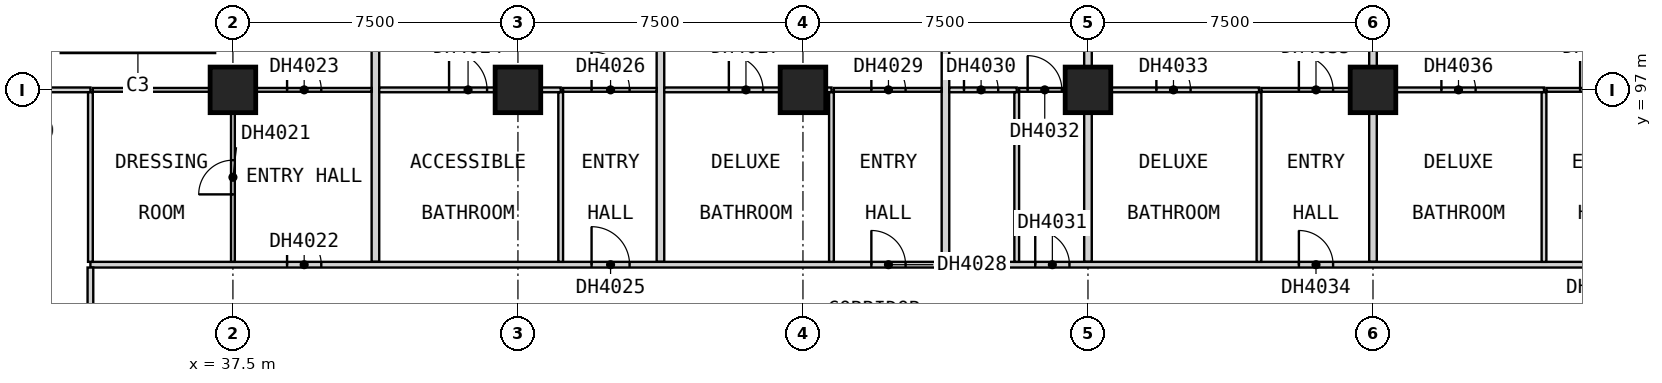
"""IFC4 building model, lengths in metres.
Left out: names, types, materials, properties, quantities, classifications, styles, units other than length and angle.
Written with IfcOpenShell. Run it as: python <this file> out.ifc"""

import sys

from ifc_helpers import new_model, si_unit, direction, frame, frame_2d, origin, origin_2d, place, context, subcontext, project, spatial, rectangle, extrude, element, fill, save


model = new_model("IFC4")
c1 = context("Model", 3, precision=1e-05, world=origin(), true_north=direction((0.0, 1.0)))
c2 = subcontext(c1, "Body", "Model", "MODEL_VIEW")
j1 = project(units=[si_unit("LENGTHUNIT", "METRE"), si_unit("PLANEANGLEUNIT", "RADIAN")], contexts=[c1])
p1 = place(None, origin())
s1 = spatial("IfcSite", under=j1, at=p1, CompositionType="ELEMENT")
p2 = place(p1, origin())
s2 = spatial("IfcBuilding", under=s1, at=p2, CompositionType="ELEMENT")
p3 = place(p2, frame((0.0, 0.0, 44.8)))
s3 = spatial("IfcBuildingStorey", under=s2, at=p3, CompositionType="ELEMENT", Elevation=44.8)
for number, where, z_axis, x_axis in (
    (1, (37.5, 97.0, 0.0), (0.0, 0.0, 1.0), (1.0, 0.0, 0.0)),
    (2, (45.0, 97.0, 0.0), (0.0, 0.0, 1.0), (1.0, 0.0, 0.0)),
    (3, (52.5, 97.0, 0.0), (0.0, 0.0, 1.0), (1.0, 0.0, 0.0)),
    (4, (60.0, 97.0, 0.0), (0.0, 0.0, 1.0), (1.0, 0.0, 0.0)),
    (5, (67.5, 97.0, 0.0), (0.0, 0.0, 1.0), (1.0, 0.0, 0.0)),
):
    element("IfcColumn", number, at=place(p3, frame(where, z_axis=z_axis, x_axis=x_axis)), inside=s3, PredefinedType="COLUMN", context=c2, shape_type="SweptSolid", body=[
        extrude(rectangle(XDim=1.2, YDim=1.2, at=origin_2d()), origin(), (0.0, 0.0, 1.0), 3.6),
    ])
for number, where, z_axis, x_axis in (
    (6, (41.25, 92.475, 0.0), (0.0, 0.0, 1.0), (0.0, 1.0, 0.0)),
    (7, (48.75, 92.475, 0.0), (0.0, 0.0, 1.0), (0.0, 1.0, 0.0)),
    (8, (56.25, 92.475, 0.0), (0.0, 0.0, 1.0), (0.0, 1.0, 0.0)),
):
    element("IfcWall", number, at=place(p3, frame(where, z_axis=z_axis, x_axis=x_axis)), inside=s3, PredefinedType="PARTITIONING", context=c2, shape_type="SweptSolid", body=[
        extrude(rectangle(XDim=11.715, YDim=0.2, at=frame_2d((5.857, 0.0))), origin(), (0.0, 0.0, 1.0), 3.35),
    ])
for number, where, z_axis, x_axis in (
    (9, (60.0, 92.475, 0.0), (0.0, 0.0, 1.0), (0.0, 1.0, 0.0)),
    (10, (67.5, 92.475, 0.0), (0.0, 0.0, 1.0), (0.0, 1.0, 0.0)),
):
    element("IfcWall", number, at=place(p3, frame(where, z_axis=z_axis, x_axis=x_axis)), inside=s3, PredefinedType="PARTITIONING", context=c2, shape_type="SweptSolid", body=[
        extrude(rectangle(XDim=12.525, YDim=0.2, at=frame_2d((6.262, 0.0))), origin(), (0.0, 0.0, 1.0), 3.35),
    ])
p4 = place(p3, frame((33.75, 92.4, 0.0), z_axis=(0.0, 0.0, 1.0), x_axis=(1.0, 0.0, 0.0)))
e11 = element("IfcWall", 11, at=p4, inside=s3, PredefinedType="PARTITIONING", context=c2, shape_type="SweptSolid", body=[
    extrude(rectangle(XDim=43.65, YDim=0.15, at=frame_2d((21.825, 0.0))), origin(), (0.0, 0.0, 1.0), 3.35),
])
p5 = place(p4, frame((5.175, 0.0, 0.0)))
e12 = element("IfcOpeningElement", 12, at=p5, cuts=e11, PredefinedType="OPENING", context=c2, shape_type="SweptSolid", body=[
    extrude(rectangle(XDim=0.9, YDim=2.1, at=frame_2d((0.45, 1.05))), frame((0.0, 0.085, 0.0), z_axis=(0.0, -1.0, 0.0), x_axis=(1.0, 0.0, 0.0)), (0.0, 0.0, 1.0), 0.17),
])
p6 = place(p4, frame((13.188, 0.0, 0.0)))
e13 = element("IfcOpeningElement", 13, at=p6, cuts=e11, PredefinedType="OPENING", context=c2, shape_type="SweptSolid", body=[
    extrude(rectangle(XDim=1.0, YDim=2.1, at=frame_2d((0.5, 1.05))), frame((0.0, 0.085, 0.0), z_axis=(0.0, -1.0, 0.0), x_axis=(1.0, 0.0, 0.0)), (0.0, 0.0, 1.0), 0.17),
])
p7 = place(p4, frame((20.55, 0.0, 0.0)))
e14 = element("IfcOpeningElement", 14, at=p7, cuts=e11, PredefinedType="OPENING", context=c2, shape_type="SweptSolid", body=[
    extrude(rectangle(XDim=0.9, YDim=2.1, at=frame_2d((0.45, 1.05))), frame((0.0, 0.085, 0.0), z_axis=(0.0, -1.0, 0.0), x_axis=(1.0, 0.0, 0.0)), (0.0, 0.0, 1.0), 0.17),
])
p8 = place(p4, frame((24.863, 0.0, 0.0)))
e15 = element("IfcOpeningElement", 15, at=p8, cuts=e11, PredefinedType="OPENING", context=c2, shape_type="SweptSolid", body=[
    extrude(rectangle(XDim=0.9, YDim=2.1, at=frame_2d((0.45, 1.05))), frame((0.0, 0.085, 0.0), z_axis=(0.0, -1.0, 0.0), x_axis=(1.0, 0.0, 0.0)), (0.0, 0.0, 1.0), 0.17),
])
p9 = place(p4, frame((31.8, 0.0, 0.0)))
e16 = element("IfcOpeningElement", 16, at=p9, cuts=e11, PredefinedType="OPENING", context=c2, shape_type="SweptSolid", body=[
    extrude(rectangle(XDim=0.9, YDim=2.1, at=frame_2d((0.45, 1.05))), frame((0.0, 0.085, 0.0), z_axis=(0.0, -1.0, 0.0), x_axis=(1.0, 0.0, 0.0)), (0.0, 0.0, 1.0), 0.17),
])
p10 = place(p4, frame((39.3, 0.0, 0.0)))
e17 = element("IfcOpeningElement", 17, at=p10, cuts=e11, PredefinedType="OPENING", context=c2, shape_type="SweptSolid", body=[
    extrude(rectangle(XDim=0.9, YDim=2.1, at=frame_2d((0.45, 1.05))), frame((0.0, 0.085, 0.0), z_axis=(0.0, -1.0, 0.0), x_axis=(1.0, 0.0, 0.0)), (0.0, 0.0, 1.0), 0.17),
])
p11 = place(p4, frame((42.0, 0.0, 0.0)))
e18 = element("IfcOpeningElement", 18, at=p11, cuts=e11, PredefinedType="OPENING", context=c2, shape_type="SweptSolid", body=[
    extrude(rectangle(XDim=0.9, YDim=2.1, at=frame_2d((0.45, 1.05))), frame((0.0, 0.085, 0.0), z_axis=(0.0, -1.0, 0.0), x_axis=(1.0, 0.0, 0.0)), (0.0, 0.0, 1.0), 0.17),
])
p12 = place(p3, frame((33.75, 90.1, 0.0), z_axis=(0.0, 0.0, 1.0), x_axis=(0.0, 1.0, 0.0)))
e19 = element("IfcWall", 19, at=p12, inside=s3, PredefinedType="PARTITIONING", context=c2, shape_type="SweptSolid", body=[
    extrude(rectangle(XDim=2.225, YDim=0.15, at=frame_2d((1.112, 0.0))), origin(), (0.0, 0.0, 1.0), 3.35),
])
p13 = place(p3, frame((33.812, 97.0, 0.0), z_axis=(0.0, 0.0, 1.0), x_axis=(1.0, 0.0, 0.0)))
e20 = element("IfcWall", 20, at=p13, inside=s3, PredefinedType="PARTITIONING", context=c2, shape_type="SweptSolid", body=[
    extrude(rectangle(XDim=7.337, YDim=0.1, at=frame_2d((3.669, 0.0))), origin(), (0.0, 0.0, 1.0), 3.35),
])
p14 = place(p13, frame((5.113, 0.0, 0.0)))
e21 = element("IfcOpeningElement", 21, at=p14, cuts=e20, PredefinedType="OPENING", context=c2, shape_type="SweptSolid", body=[
    extrude(rectangle(XDim=0.9, YDim=2.1, at=frame_2d((0.45, 1.05))), frame((0.0, 0.06, 0.0), z_axis=(0.0, -1.0, 0.0), x_axis=(1.0, 0.0, 0.0)), (0.0, 0.0, 1.0), 0.12),
])
p15 = place(p3, frame((46.188, 97.0, 0.0), z_axis=(0.0, 0.0, 1.0), x_axis=(1.0, 0.0, 0.0)))
e22 = element("IfcWall", 22, at=p15, inside=s3, PredefinedType="PARTITIONING", context=c2, shape_type="SweptSolid", body=[
    extrude(rectangle(XDim=2.462, YDim=0.1, at=frame_2d((1.231, 0.0))), origin(), (0.0, 0.0, 1.0), 3.35),
])
p16 = place(p15, frame((0.75, 0.0, 0.0)))
e23 = element("IfcOpeningElement", 23, at=p16, cuts=e22, PredefinedType="OPENING", context=c2, shape_type="SweptSolid", body=[
    extrude(rectangle(XDim=1.0, YDim=2.1, at=frame_2d((0.5, 1.05))), frame((0.0, 0.06, 0.0), z_axis=(0.0, -1.0, 0.0), x_axis=(1.0, 0.0, 0.0)), (0.0, 0.0, 1.0), 0.12),
])
p17 = place(p3, frame((53.312, 97.0, 0.0), z_axis=(0.0, 0.0, 1.0), x_axis=(1.0, 0.0, 0.0)))
e24 = element("IfcWall", 24, at=p17, inside=s3, PredefinedType="PARTITIONING", context=c2, shape_type="SweptSolid", body=[
    extrude(rectangle(XDim=2.837, YDim=0.1, at=frame_2d((1.419, 0.0))), origin(), (0.0, 0.0, 1.0), 3.35),
])
p18 = place(p17, frame((0.988, 0.0, 0.0)))
e25 = element("IfcOpeningElement", 25, at=p18, cuts=e24, PredefinedType="OPENING", context=c2, shape_type="SweptSolid", body=[
    extrude(rectangle(XDim=0.9, YDim=2.1, at=frame_2d((0.45, 1.05))), frame((0.0, 0.06, 0.0), z_axis=(0.0, -1.0, 0.0), x_axis=(1.0, 0.0, 0.0)), (0.0, 0.0, 1.0), 0.12),
])
p19 = place(p3, frame((58.188, 97.0, 0.0), z_axis=(0.0, 0.0, 1.0), x_axis=(1.0, 0.0, 0.0)))
e26 = element("IfcWall", 26, at=p19, inside=s3, PredefinedType="PARTITIONING", context=c2, shape_type="SweptSolid", body=[
    extrude(rectangle(XDim=1.712, YDim=0.1, at=frame_2d((0.856, 0.0))), origin(), (0.0, 0.0, 1.0), 3.35),
])
p20 = place(p19, frame((0.225, 0.0, 0.0)))
e27 = element("IfcOpeningElement", 27, at=p20, cuts=e26, PredefinedType="OPENING", context=c2, shape_type="SweptSolid", body=[
    extrude(rectangle(XDim=0.9, YDim=2.1, at=frame_2d((0.45, 1.05))), frame((0.0, 0.06, 0.0), z_axis=(0.0, -1.0, 0.0), x_axis=(1.0, 0.0, 0.0)), (0.0, 0.0, 1.0), 0.12),
])
p21 = place(p3, frame((64.562, 97.0, 0.0), z_axis=(0.0, 0.0, 1.0), x_axis=(1.0, 0.0, 0.0)))
e28 = element("IfcWall", 28, at=p21, inside=s3, PredefinedType="PARTITIONING", context=c2, shape_type="SweptSolid", body=[
    extrude(rectangle(XDim=2.837, YDim=0.1, at=frame_2d((1.419, 0.0))), origin(), (0.0, 0.0, 1.0), 3.35),
])
p22 = place(p21, frame((0.988, 0.0, 0.0)))
e29 = element("IfcOpeningElement", 29, at=p22, cuts=e28, PredefinedType="OPENING", context=c2, shape_type="SweptSolid", body=[
    extrude(rectangle(XDim=0.9, YDim=2.1, at=frame_2d((0.45, 1.05))), frame((0.0, 0.06, 0.0), z_axis=(0.0, -1.0, 0.0), x_axis=(1.0, 0.0, 0.0)), (0.0, 0.0, 1.0), 0.12),
])
p23 = place(p3, frame((72.062, 97.0, 0.0), z_axis=(0.0, 0.0, 1.0), x_axis=(1.0, 0.0, 0.0)))
e30 = element("IfcWall", 30, at=p23, inside=s3, PredefinedType="PARTITIONING", context=c2, shape_type="SweptSolid", body=[
    extrude(rectangle(XDim=2.837, YDim=0.1, at=frame_2d((1.419, 0.0))), origin(), (0.0, 0.0, 1.0), 3.35),
])
p24 = place(p23, frame((0.887, 0.0, 0.0)))
e31 = element("IfcOpeningElement", 31, at=p24, cuts=e30, PredefinedType="OPENING", context=c2, shape_type="SweptSolid", body=[
    extrude(rectangle(XDim=0.9, YDim=2.1, at=frame_2d((0.45, 1.05))), frame((0.0, 0.06, 0.0), z_axis=(0.0, -1.0, 0.0), x_axis=(1.0, 0.0, 0.0)), (0.0, 0.0, 1.0), 0.12),
])
p25 = place(p3, frame((37.5, 92.475, 0.0), z_axis=(0.0, 0.0, 1.0), x_axis=(0.0, 1.0, 0.0)))
e32 = element("IfcWall", 32, at=p25, inside=s3, PredefinedType="PARTITIONING", context=c2, shape_type="SweptSolid", body=[
    extrude(rectangle(XDim=4.475, YDim=0.1, at=frame_2d((2.237, 0.0))), origin(), (0.0, 0.0, 1.0), 3.35),
])
p26 = place(p25, frame((1.775, 0.0, 0.0)))
e33 = element("IfcOpeningElement", 33, at=p26, cuts=e32, PredefinedType="OPENING", context=c2, shape_type="SweptSolid", body=[
    extrude(rectangle(XDim=0.9, YDim=2.1, at=frame_2d((0.45, 1.05))), frame((0.0, 0.06, 0.0), z_axis=(0.0, -1.0, 0.0), x_axis=(1.0, 0.0, 0.0)), (0.0, 0.0, 1.0), 0.12),
])
p27 = place(p3, frame((30.0, 97.0, 0.0), z_axis=(0.0, 0.0, 1.0), x_axis=(1.0, 0.0, 0.0)))
e34 = element("IfcWall", 34, at=p27, inside=s3, PredefinedType="PARTITIONING", context=c2, shape_type="SweptSolid", body=[
    extrude(rectangle(XDim=3.75, YDim=0.125, at=frame_2d((1.875, 0.0))), origin(), (0.0, 0.0, 1.0), 3.35),
])
p28 = place(p27, frame((1.425, 0.0, 0.0)))
e35 = element("IfcOpeningElement", 35, at=p28, cuts=e34, PredefinedType="OPENING", context=c2, shape_type="SweptSolid", body=[
    extrude(rectangle(XDim=0.9, YDim=2.1, at=frame_2d((0.45, 1.05))), frame((0.0, 0.073, 0.0), z_axis=(0.0, -1.0, 0.0), x_axis=(1.0, 0.0, 0.0)), (0.0, 0.0, 1.0), 0.145),
])
p29 = place(p3, frame((41.35, 97.0, 0.0), z_axis=(0.0, 0.0, 1.0), x_axis=(1.0, 0.0, 0.0)))
e36 = element("IfcWall", 36, at=p29, inside=s3, PredefinedType="PARTITIONING", context=c2, shape_type="SweptSolid", body=[
    extrude(rectangle(XDim=4.775, YDim=0.125, at=frame_2d((2.387, 0.0))), origin(), (0.0, 0.0, 1.0), 3.35),
])
p30 = place(p29, frame((1.837, 0.0, 0.0)))
e37 = element("IfcOpeningElement", 37, at=p30, cuts=e36, PredefinedType="OPENING", context=c2, shape_type="SweptSolid", body=[
    extrude(rectangle(XDim=1.0, YDim=2.1, at=frame_2d((0.5, 1.05))), frame((0.0, 0.073, 0.0), z_axis=(0.0, -1.0, 0.0), x_axis=(1.0, 0.0, 0.0)), (0.0, 0.0, 1.0), 0.145),
])
p31 = place(p3, frame((48.85, 97.0, 0.0), z_axis=(0.0, 0.0, 1.0), x_axis=(1.0, 0.0, 0.0)))
e38 = element("IfcWall", 38, at=p31, inside=s3, PredefinedType="PARTITIONING", context=c2, shape_type="SweptSolid", body=[
    extrude(rectangle(XDim=4.4, YDim=0.125, at=frame_2d((2.2, 0.0))), origin(), (0.0, 0.0, 1.0), 3.35),
])
p32 = place(p31, frame((1.7, 0.0, 0.0)))
e39 = element("IfcOpeningElement", 39, at=p32, cuts=e38, PredefinedType="OPENING", context=c2, shape_type="SweptSolid", body=[
    extrude(rectangle(XDim=0.9, YDim=2.1, at=frame_2d((0.45, 1.05))), frame((0.0, 0.073, 0.0), z_axis=(0.0, -1.0, 0.0), x_axis=(1.0, 0.0, 0.0)), (0.0, 0.0, 1.0), 0.145),
])
p33 = place(p3, frame((56.35, 97.0, 0.0), z_axis=(0.0, 0.0, 1.0), x_axis=(1.0, 0.0, 0.0)))
e40 = element("IfcWall", 40, at=p33, inside=s3, PredefinedType="PARTITIONING", context=c2, shape_type="SweptSolid", body=[
    extrude(rectangle(XDim=1.775, YDim=0.125, at=frame_2d((0.887, 0.0))), origin(), (0.0, 0.0, 1.0), 3.35),
])
p34 = place(p33, frame((0.387, 0.0, 0.0)))
e41 = element("IfcOpeningElement", 41, at=p34, cuts=e40, PredefinedType="OPENING", context=c2, shape_type="SweptSolid", body=[
    extrude(rectangle(XDim=0.9, YDim=2.1, at=frame_2d((0.45, 1.05))), frame((0.0, 0.073, 0.0), z_axis=(0.0, -1.0, 0.0), x_axis=(1.0, 0.0, 0.0)), (0.0, 0.0, 1.0), 0.145),
])
p35 = place(p3, frame((60.1, 97.0, 0.0), z_axis=(0.0, 0.0, 1.0), x_axis=(1.0, 0.0, 0.0)))
e42 = element("IfcWall", 42, at=p35, inside=s3, PredefinedType="PARTITIONING", context=c2, shape_type="SweptSolid", body=[
    extrude(rectangle(XDim=4.4, YDim=0.125, at=frame_2d((2.2, 0.0))), origin(), (0.0, 0.0, 1.0), 3.35),
])
p36 = place(p35, frame((1.7, 0.0, 0.0)))
e43 = element("IfcOpeningElement", 43, at=p36, cuts=e42, PredefinedType="OPENING", context=c2, shape_type="SweptSolid", body=[
    extrude(rectangle(XDim=0.9, YDim=2.1, at=frame_2d((0.45, 1.05))), frame((0.0, 0.073, 0.0), z_axis=(0.0, -1.0, 0.0), x_axis=(1.0, 0.0, 0.0)), (0.0, 0.0, 1.0), 0.145),
])
p37 = place(p3, frame((67.6, 97.0, 0.0), z_axis=(0.0, 0.0, 1.0), x_axis=(1.0, 0.0, 0.0)))
e44 = element("IfcWall", 44, at=p37, inside=s3, PredefinedType="PARTITIONING", context=c2, shape_type="SweptSolid", body=[
    extrude(rectangle(XDim=4.4, YDim=0.125, at=frame_2d((2.2, 0.0))), origin(), (0.0, 0.0, 1.0), 3.35),
])
p38 = place(p37, frame((1.7, 0.0, 0.0)))
e45 = element("IfcOpeningElement", 45, at=p38, cuts=e44, PredefinedType="OPENING", context=c2, shape_type="SweptSolid", body=[
    extrude(rectangle(XDim=0.9, YDim=2.1, at=frame_2d((0.45, 1.05))), frame((0.0, 0.073, 0.0), z_axis=(0.0, -1.0, 0.0), x_axis=(1.0, 0.0, 0.0)), (0.0, 0.0, 1.0), 0.145),
])
for number, where, z_axis, x_axis in (
    (46, (33.75, 92.475, 0.0), (0.0, 0.0, 1.0), (0.0, 1.0, 0.0)),
    (47, (46.125, 92.475, 0.0), (0.0, 0.0, 1.0), (0.0, 1.0, 0.0)),
    (48, (53.25, 92.475, 0.0), (0.0, 0.0, 1.0), (0.0, 1.0, 0.0)),
    (49, (58.125, 92.475, 0.0), (0.0, 0.0, 1.0), (0.0, 1.0, 0.0)),
    (50, (64.5, 92.475, 0.0), (0.0, 0.0, 1.0), (0.0, 1.0, 0.0)),
    (51, (72.0, 92.475, 0.0), (0.0, 0.0, 1.0), (0.0, 1.0, 0.0)),
):
    element("IfcWall", number, at=place(p3, frame(where, z_axis=z_axis, x_axis=x_axis)), inside=s3, PredefinedType="PARTITIONING", context=c2, shape_type="SweptSolid", body=[
        extrude(rectangle(XDim=4.462, YDim=0.125, at=frame_2d((2.231, 0.0))), origin(), (0.0, 0.0, 1.0), 3.35),
    ])
p39 = place(p26, origin())
e52 = element("IfcDoor", 52, at=p39, inside=s3, OperationType="SINGLE_SWING_RIGHT", PredefinedType="DOOR", context=c2, shape_type="SweptSolid", body=[
    extrude(rectangle(XDim=0.9, YDim=2.1, at=frame_2d((0.45, 1.05))), frame((0.0, 0.025, 0.0), z_axis=(0.0, -1.0, 0.0), x_axis=(1.0, 0.0, 0.0)), (0.0, 0.0, 1.0), 0.05),
])
fill(e33, e52)
p40 = place(p5, origin())
e53 = element("IfcDoor", 53, at=p40, inside=s3, OperationType="SINGLE_SWING_LEFT", PredefinedType="DOOR", context=c2, shape_type="SweptSolid", body=[
    extrude(rectangle(XDim=0.9, YDim=2.1, at=frame_2d((0.45, 1.05))), frame((0.0, 0.025, 0.0), z_axis=(0.0, -1.0, 0.0), x_axis=(1.0, 0.0, 0.0)), (0.0, 0.0, 1.0), 0.05),
])
fill(e12, e53)
p41 = place(p14, origin())
e54 = element("IfcDoor", 54, at=p41, inside=s3, OperationType="SINGLE_SWING_RIGHT", PredefinedType="DOOR", context=c2, shape_type="SweptSolid", body=[
    extrude(rectangle(XDim=0.9, YDim=2.1, at=frame_2d((0.45, 1.05))), frame((0.0, 0.025, 0.0), z_axis=(0.0, -1.0, 0.0), x_axis=(1.0, 0.0, 0.0)), (0.0, 0.0, 1.0), 0.05),
])
fill(e21, e54)
p42 = place(p30, origin())
e55 = element("IfcDoor", 55, at=p42, inside=s3, OperationType="SINGLE_SWING_RIGHT", PredefinedType="DOOR", context=c2, shape_type="SweptSolid", body=[
    extrude(rectangle(XDim=1.0, YDim=2.1, at=frame_2d((0.5, 1.05))), frame((0.0, 0.025, 0.0), z_axis=(0.0, -1.0, 0.0), x_axis=(1.0, 0.0, 0.0)), (0.0, 0.0, 1.0), 0.05),
])
fill(e37, e55)
p43 = place(p6, origin())
e56 = element("IfcDoor", 56, at=p43, inside=s3, OperationType="SINGLE_SWING_LEFT", PredefinedType="DOOR", context=c2, shape_type="SweptSolid", body=[
    extrude(rectangle(XDim=1.0, YDim=2.1, at=frame_2d((0.5, 1.05))), frame((0.0, 0.025, 0.0), z_axis=(0.0, -1.0, 0.0), x_axis=(1.0, 0.0, 0.0)), (0.0, 0.0, 1.0), 0.05),
])
fill(e13, e56)
p44 = place(p16, origin())
e57 = element("IfcDoor", 57, at=p44, inside=s3, OperationType="SINGLE_SWING_RIGHT", PredefinedType="DOOR", context=c2, shape_type="SweptSolid", body=[
    extrude(rectangle(XDim=1.0, YDim=2.1, at=frame_2d((0.5, 1.05))), frame((0.0, 0.025, 0.0), z_axis=(0.0, -1.0, 0.0), x_axis=(1.0, 0.0, 0.0)), (0.0, 0.0, 1.0), 0.05),
])
fill(e23, e57)
p45 = place(p32, origin())
e58 = element("IfcDoor", 58, at=p45, inside=s3, OperationType="SINGLE_SWING_RIGHT", PredefinedType="DOOR", context=c2, shape_type="SweptSolid", body=[
    extrude(rectangle(XDim=0.9, YDim=2.1, at=frame_2d((0.45, 1.05))), frame((0.0, 0.025, 0.0), z_axis=(0.0, -1.0, 0.0), x_axis=(1.0, 0.0, 0.0)), (0.0, 0.0, 1.0), 0.05),
])
fill(e39, e58)
p46 = place(p7, origin())
e59 = element("IfcDoor", 59, at=p46, inside=s3, OperationType="SINGLE_SWING_LEFT", PredefinedType="DOOR", context=c2, shape_type="SweptSolid", body=[
    extrude(rectangle(XDim=0.9, YDim=2.1, at=frame_2d((0.45, 1.05))), frame((0.0, 0.025, 0.0), z_axis=(0.0, -1.0, 0.0), x_axis=(1.0, 0.0, 0.0)), (0.0, 0.0, 1.0), 0.05),
])
fill(e14, e59)
p47 = place(p18, origin())
e60 = element("IfcDoor", 60, at=p47, inside=s3, OperationType="SINGLE_SWING_RIGHT", PredefinedType="DOOR", context=c2, shape_type="SweptSolid", body=[
    extrude(rectangle(XDim=0.9, YDim=2.1, at=frame_2d((0.45, 1.05))), frame((0.0, 0.025, 0.0), z_axis=(0.0, -1.0, 0.0), x_axis=(1.0, 0.0, 0.0)), (0.0, 0.0, 1.0), 0.05),
])
fill(e25, e60)
p48 = place(p34, origin())
e61 = element("IfcDoor", 61, at=p48, inside=s3, OperationType="SINGLE_SWING_RIGHT", PredefinedType="DOOR", context=c2, shape_type="SweptSolid", body=[
    extrude(rectangle(XDim=0.9, YDim=2.1, at=frame_2d((0.45, 1.05))), frame((0.0, 0.025, 0.0), z_axis=(0.0, -1.0, 0.0), x_axis=(1.0, 0.0, 0.0)), (0.0, 0.0, 1.0), 0.05),
])
fill(e41, e61)
p49 = place(p8, origin())
e62 = element("IfcDoor", 62, at=p49, inside=s3, OperationType="SINGLE_SWING_LEFT", PredefinedType="DOOR", context=c2, shape_type="SweptSolid", body=[
    extrude(rectangle(XDim=0.9, YDim=2.1, at=frame_2d((0.45, 1.05))), frame((0.0, 0.025, 0.0), z_axis=(0.0, -1.0, 0.0), x_axis=(1.0, 0.0, 0.0)), (0.0, 0.0, 1.0), 0.05),
])
fill(e15, e62)
p50 = place(p20, origin())
e63 = element("IfcDoor", 63, at=p50, inside=s3, OperationType="SINGLE_SWING_RIGHT", PredefinedType="DOOR", context=c2, shape_type="SweptSolid", body=[
    extrude(rectangle(XDim=0.9, YDim=2.1, at=frame_2d((0.45, 1.05))), frame((0.0, 0.025, 0.0), z_axis=(0.0, -1.0, 0.0), x_axis=(1.0, 0.0, 0.0)), (0.0, 0.0, 1.0), 0.05),
])
fill(e27, e63)
p51 = place(p36, origin())
e64 = element("IfcDoor", 64, at=p51, inside=s3, OperationType="SINGLE_SWING_RIGHT", PredefinedType="DOOR", context=c2, shape_type="SweptSolid", body=[
    extrude(rectangle(XDim=0.9, YDim=2.1, at=frame_2d((0.45, 1.05))), frame((0.0, 0.025, 0.0), z_axis=(0.0, -1.0, 0.0), x_axis=(1.0, 0.0, 0.0)), (0.0, 0.0, 1.0), 0.05),
])
fill(e43, e64)
p52 = place(p9, origin())
e65 = element("IfcDoor", 65, at=p52, inside=s3, OperationType="SINGLE_SWING_LEFT", PredefinedType="DOOR", context=c2, shape_type="SweptSolid", body=[
    extrude(rectangle(XDim=0.9, YDim=2.1, at=frame_2d((0.45, 1.05))), frame((0.0, 0.025, 0.0), z_axis=(0.0, -1.0, 0.0), x_axis=(1.0, 0.0, 0.0)), (0.0, 0.0, 1.0), 0.05),
])
fill(e16, e65)
p53 = place(p22, origin())
e66 = element("IfcDoor", 66, at=p53, inside=s3, OperationType="SINGLE_SWING_RIGHT", PredefinedType="DOOR", context=c2, shape_type="SweptSolid", body=[
    extrude(rectangle(XDim=0.9, YDim=2.1, at=frame_2d((0.45, 1.05))), frame((0.0, 0.025, 0.0), z_axis=(0.0, -1.0, 0.0), x_axis=(1.0, 0.0, 0.0)), (0.0, 0.0, 1.0), 0.05),
])
fill(e29, e66)
p54 = place(p38, origin())
e67 = element("IfcDoor", 67, at=p54, inside=s3, OperationType="SINGLE_SWING_RIGHT", PredefinedType="DOOR", context=c2, shape_type="SweptSolid", body=[
    extrude(rectangle(XDim=0.9, YDim=2.1, at=frame_2d((0.45, 1.05))), frame((0.0, 0.025, 0.0), z_axis=(0.0, -1.0, 0.0), x_axis=(1.0, 0.0, 0.0)), (0.0, 0.0, 1.0), 0.05),
])
fill(e45, e67)
p55 = place(p24, origin())
e68 = element("IfcDoor", 68, at=p55, inside=s3, OperationType="SINGLE_SWING_RIGHT", PredefinedType="DOOR", context=c2, shape_type="SweptSolid", body=[
    extrude(rectangle(XDim=0.9, YDim=2.1, at=frame_2d((0.45, 1.05))), frame((0.0, 0.025, 0.0), z_axis=(0.0, -1.0, 0.0), x_axis=(1.0, 0.0, 0.0)), (0.0, 0.0, 1.0), 0.05),
])
fill(e31, e68)
save(model, sys.argv[1])
